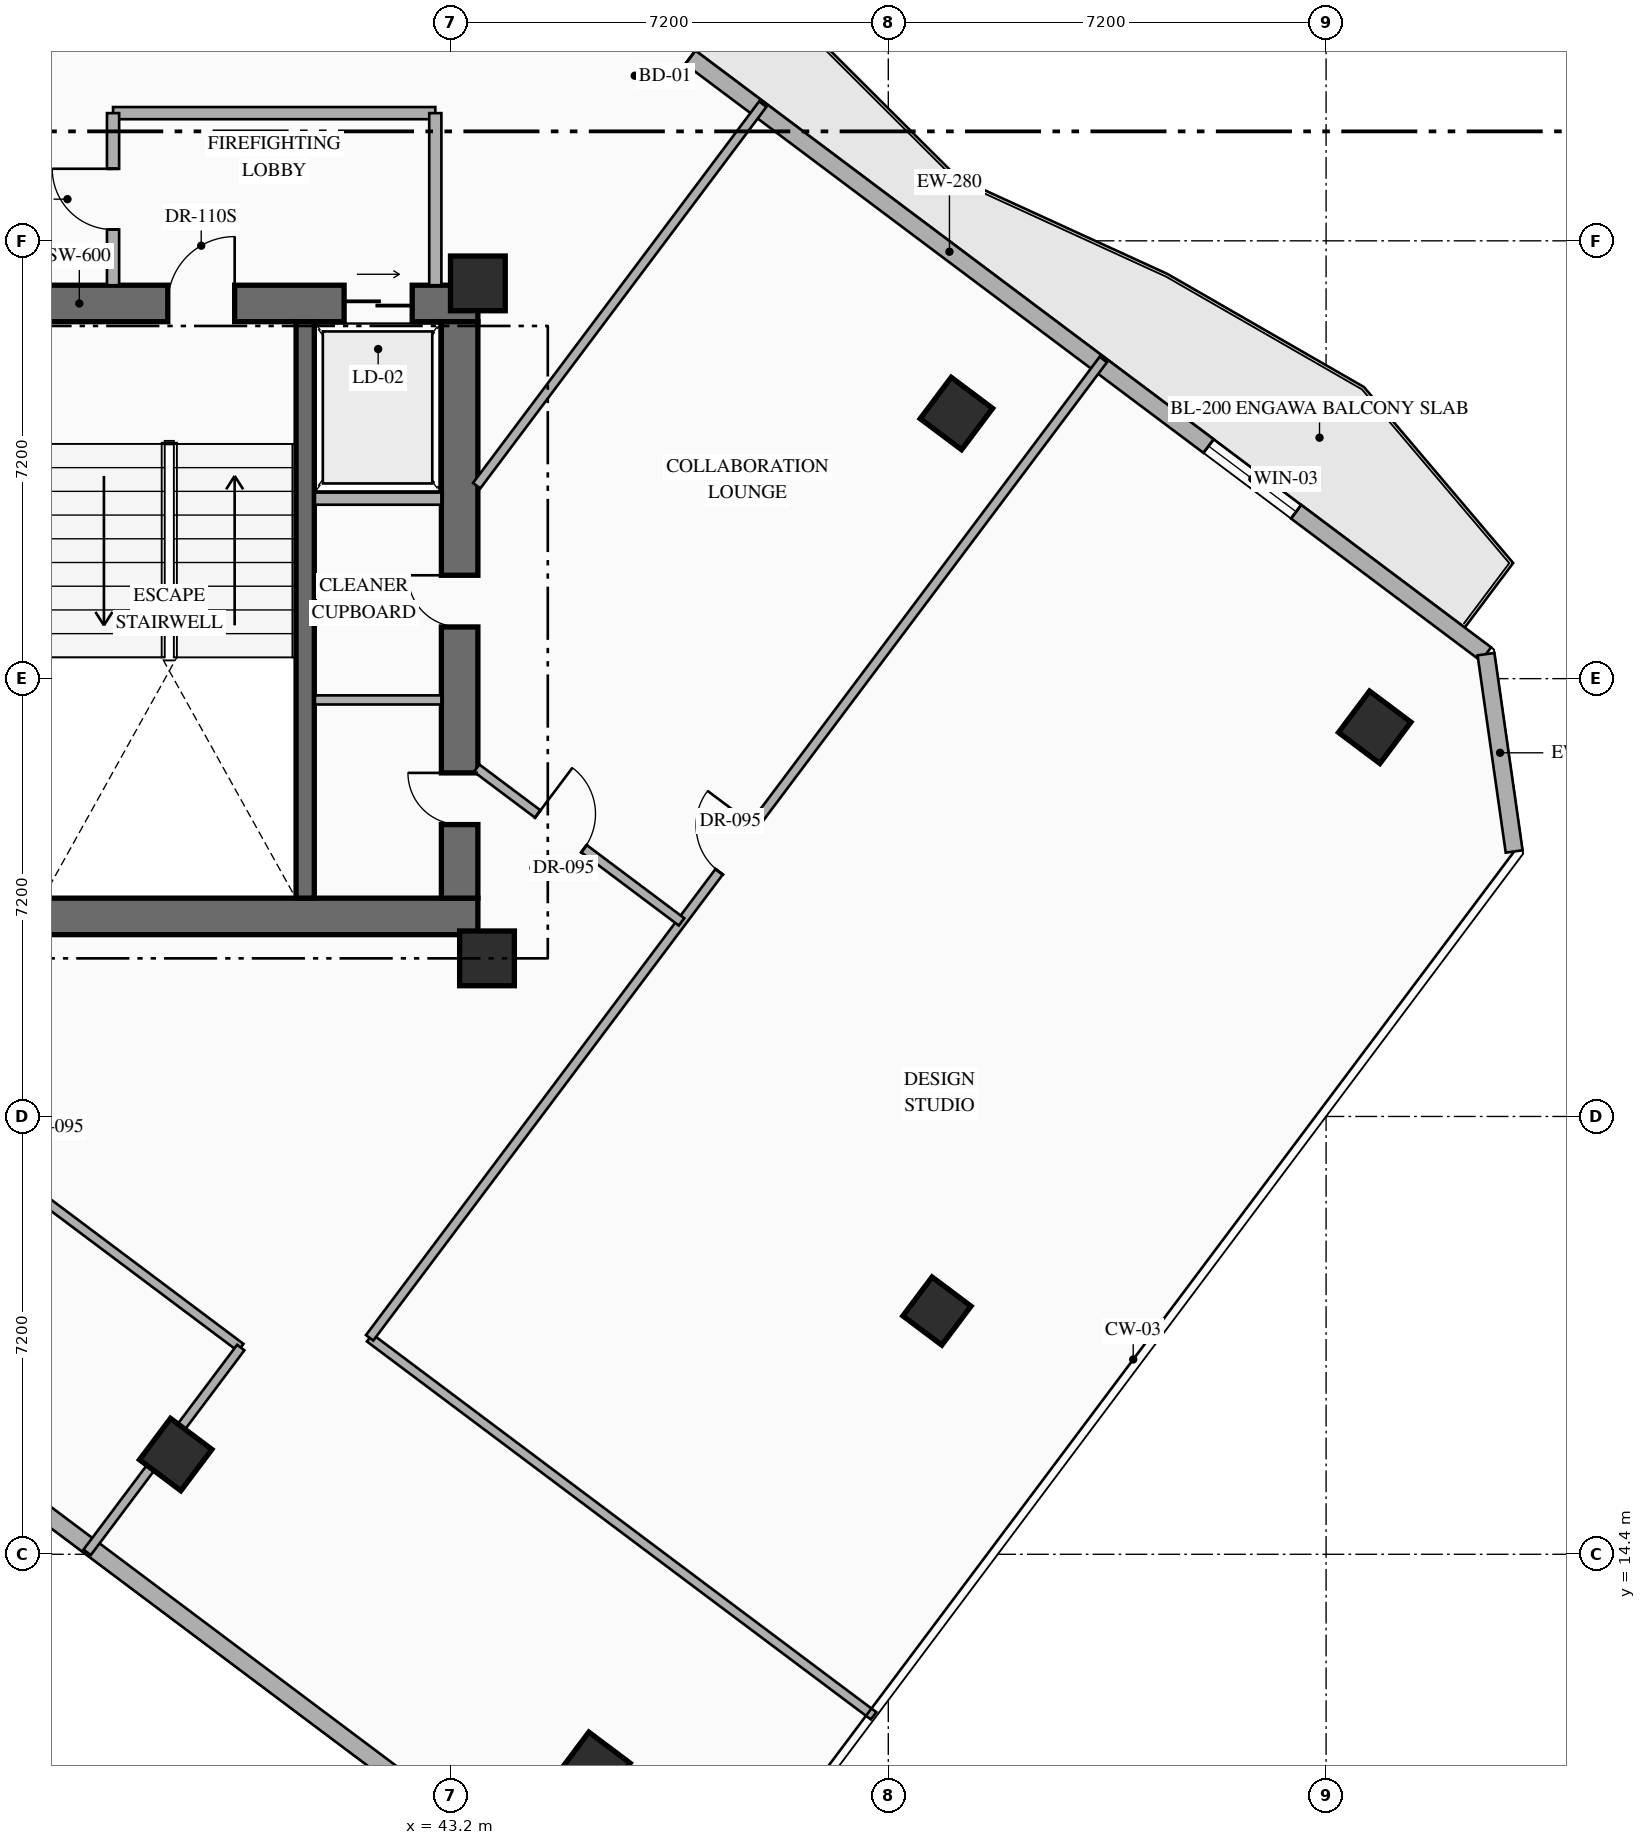
"""IFC4 building model, lengths in metres.
Left out: names, types, materials, properties, quantities, classifications, styles, units other than length and angle.
Written with IfcOpenShell. Run it as: python <this file> out.ifc"""

import sys

from ifc_helpers import new_model, si_unit, direction, frame, frame_2d, origin, origin_2d, place, context, subcontext, project, spatial, rectangle, hollow_rectangle, extrude, element, fill, save


model = new_model("IFC4")
c1 = context("Model", 3, precision=1e-05, world=origin(), true_north=direction((0.0, 1.0)))
c2 = subcontext(c1, "Body", "Model", "MODEL_VIEW")
j1 = project(units=[si_unit("LENGTHUNIT", "METRE"), si_unit("PLANEANGLEUNIT", "RADIAN")], contexts=[c1])
p1 = place(None, origin())
s1 = spatial("IfcSite", under=j1, at=p1, CompositionType="ELEMENT")
p2 = place(p1, origin())
s2 = spatial("IfcBuilding", under=s1, at=p2, CompositionType="ELEMENT")
p3 = place(p2, frame((0.0, 0.0, 134.85)))
s3 = spatial("IfcBuildingStorey", under=s2, at=p3, CompositionType="ELEMENT", Elevation=134.85)
p4 = place(p3, frame((35.89, 24.89, 0.0), z_axis=(0.0, 0.0, 1.0), x_axis=(1.0, 0.0, 0.0)))
e1 = element("IfcWall", 1, at=p4, inside=s3, PredefinedType="SHEAR", context=c2, shape_type="SweptSolid", body=[
    extrude(rectangle(XDim=7.76, YDim=0.6, at=frame_2d((3.88, 0.0))), origin(), (0.0, 0.0, 1.0), 3.6),
])
p5 = place(p3, frame((35.89, 34.97, 0.0), z_axis=(0.0, 0.0, 1.0), x_axis=(1.0, 0.0, 0.0)))
e2 = element("IfcWall", 2, at=p5, inside=s3, PredefinedType="SHEAR", context=c2, shape_type="SweptSolid", body=[
    extrude(rectangle(XDim=7.76, YDim=0.6, at=frame_2d((3.88, 0.0))), origin(), (0.0, 0.0, 1.0), 3.6),
])
p6 = place(p5, frame((2.66, 0.0, 0.0)))
e3 = element("IfcOpeningElement", 3, at=p6, cuts=e2, PredefinedType="OPENING", context=c2, shape_type="SweptSolid", body=[
    extrude(rectangle(XDim=1.1, YDim=2.2, at=frame_2d((0.55, 1.1))), frame((0.0, 0.31, 0.0), z_axis=(0.0, -1.0, 0.0), x_axis=(1.0, 0.0, 0.0)), (0.0, 0.0, 1.0), 0.62),
])
p7 = place(p5, frame((5.56, 0.0, 0.0)))
e4 = element("IfcOpeningElement", 4, at=p7, cuts=e2, PredefinedType="OPENING", context=c2, shape_type="SweptSolid", body=[
    extrude(rectangle(XDim=1.12, YDim=2.15, at=frame_2d((0.56, 1.075))), frame((0.0, 0.31, 0.0), z_axis=(0.0, -1.0, 0.0), x_axis=(1.0, 0.0, 0.0)), (0.0, 0.0, 1.0), 0.62),
])
p8 = place(p3, frame((43.35, 25.19, 0.0), z_axis=(0.0, 0.0, 1.0), x_axis=(0.0, 1.0, 0.0)))
e5 = element("IfcWall", 5, at=p8, inside=s3, PredefinedType="SHEAR", context=c2, shape_type="SweptSolid", body=[
    extrude(rectangle(XDim=9.48, YDim=0.6, at=frame_2d((4.74, 0.0))), origin(), (0.0, 0.0, 1.0), 3.6),
])
p9 = place(p8, frame((1.21, 0.0, 0.0)))
e6 = element("IfcOpeningElement", 6, at=p9, cuts=e5, PredefinedType="OPENING", context=c2, shape_type="SweptSolid", body=[
    extrude(rectangle(XDim=0.85, YDim=2.08, at=frame_2d((0.425, 1.04))), frame((0.0, 0.31, 0.0), z_axis=(0.0, -1.0, 0.0), x_axis=(1.0, 0.0, 0.0)), (0.0, 0.0, 1.0), 0.62),
])
p10 = place(p8, frame((4.46, 0.0, 0.0)))
e7 = element("IfcOpeningElement", 7, at=p10, cuts=e5, PredefinedType="OPENING", context=c2, shape_type="SweptSolid", body=[
    extrude(rectangle(XDim=0.85, YDim=2.08, at=frame_2d((0.425, 1.04))), frame((0.0, 0.31, 0.0), z_axis=(0.0, -1.0, 0.0), x_axis=(1.0, 0.0, 0.0)), (0.0, 0.0, 1.0), 0.62),
])
p11 = place(p3, frame((40.81, 25.19, 0.0), z_axis=(0.0, 0.0, 1.0), x_axis=(0.0, 1.0, 0.0)))
e8 = element("IfcWall", 8, at=p11, inside=s3, PredefinedType="SHEAR", context=c2, shape_type="SweptSolid", body=[
    extrude(rectangle(XDim=9.48, YDim=0.3, at=frame_2d((4.74, 0.0))), origin(), (0.0, 0.0, 1.0), 3.6),
])
for number, where, z_axis, x_axis in (
    (9, (43.8, 24.2, 0.0), (0.0, 0.0, 1.0), (1.0, 0.0, 0.0)),
    (10, (43.65, 35.3, 0.0), (0.0, 0.0, 1.0), (1.0, 0.0, 0.0)),
):
    element("IfcColumn", number, at=place(p3, frame(where, z_axis=z_axis, x_axis=x_axis)), inside=s3, PredefinedType="COLUMN", context=c2, shape_type="SweptSolid", body=[
        extrude(rectangle(XDim=0.9, YDim=0.9, at=origin_2d()), origin(), (0.0, 0.0, 1.0), 3.6),
    ])
for number, where, z_axis, x_axis in (
    (11, (38.68, 16.04, 0.0), (0.0, 0.0, 1.0), (0.8, -0.6, 0.0)),
    (12, (51.52, 33.16, 0.0), (0.0, 0.0, 1.0), (0.8, -0.6, 0.0)),
    (13, (45.56, 10.88, 0.0), (0.0, 0.0, 1.0), (0.8, -0.6, 0.0)),
    (14, (58.4, 28.0, 0.0), (0.0, 0.0, 1.0), (0.8, -0.6, 0.0)),
):
    element("IfcColumn", number, at=place(p3, frame(where, z_axis=z_axis, x_axis=x_axis)), inside=s3, PredefinedType="COLUMN", context=c2, shape_type="SweptSolid", body=[
        extrude(hollow_rectangle(XDim=0.85, YDim=0.85, WallThickness=0.032, at=origin_2d()), origin(), (0.0, 0.0, 1.0), 3.6),
    ])
p12 = place(p3, frame((51.2, 18.4, 0.0), z_axis=(0.0, 0.0, 1.0), x_axis=(0.799999996291, -0.600000004945, 0.0)))
e15 = element("IfcColumn", 15, at=p12, inside=s3, PredefinedType="COLUMN", context=c2, shape_type="SweptSolid", body=[
    extrude(hollow_rectangle(XDim=0.8, YDim=0.8, WallThickness=0.032, at=origin_2d()), origin(), (0.0, 0.0, 1.0), 3.6),
])
p13 = place(p3, frame((44.86, 40.73, 0.0), z_axis=(0.0, 0.0, 1.0), x_axis=(0.800007624502, -0.599989833863, 0.0)))
e16 = element("IfcWall", 16, at=p13, inside=s3, PredefinedType="STANDARD", context=c2, shape_type="SweptSolid", body=[
    extrude(rectangle(XDim=19.212, YDim=0.28, at=frame_2d((9.606, 0.0))), origin(), (0.0, 0.0, 1.0), 3.35),
])
p14 = place(p13, frame((1.755, 0.0, 0.0)))
e17 = element("IfcOpeningElement", 17, at=p14, cuts=e16, PredefinedType="OPENING", context=c2, shape_type="SweptSolid", body=[
    extrude(rectangle(XDim=1.1, YDim=2.2, at=frame_2d((0.55, 1.1))), frame((0.0, 0.15, 0.0), z_axis=(0.0, -1.0, 0.0), x_axis=(1.0, 0.0, 0.0)), (0.0, 0.0, 1.0), 0.3),
])
p15 = place(p13, frame((13.509, 0.0, 0.85)))
e18 = element("IfcOpeningElement", 18, at=p15, cuts=e16, PredefinedType="OPENING", context=c2, shape_type="SweptSolid", body=[
    extrude(rectangle(XDim=1.8, YDim=2.1, at=frame_2d((0.9, 1.05))), frame((0.0, 0.15, 0.0), z_axis=(0.0, -1.0, 0.0), x_axis=(1.0, 0.0, 0.0)), (0.0, 0.0, 1.0), 0.3),
])
p16 = place(p3, frame((60.23, 29.203, 0.0), z_axis=(0.0, 0.0, 1.0), x_axis=(0.141296221922, -0.989967361922, 0.0)))
e19 = element("IfcWall", 19, at=p16, inside=s3, PredefinedType="STANDARD", context=c2, shape_type="SweptSolid", body=[
    extrude(rectangle(XDim=3.278, YDim=0.28, at=frame_2d((1.639, 0.0))), origin(), (0.0, 0.0, 1.0), 3.35),
])
p17 = place(p3, frame((44.918, 8.787, 0.0), z_axis=(0.0, 0.0, 1.0), x_axis=(-0.800004765927, 0.599993645378, 0.0)))
e20 = element("IfcWall", 20, at=p17, inside=s3, PredefinedType="STANDARD", context=c2, shape_type="SweptSolid", body=[
    extrude(rectangle(XDim=24.588, YDim=0.28, at=frame_2d((12.294, 0.0))), origin(), (0.0, 0.0, 1.0), 3.35),
])
p18 = place(p3, frame((40.97, 31.76, 0.0), z_axis=(0.0, 0.0, 1.0), x_axis=(1.0, 0.0, 0.0)))
e21 = element("IfcWall", 21, at=p18, inside=s3, PredefinedType="STANDARD", context=c2, shape_type="SweptSolid", body=[
    extrude(rectangle(XDim=2.08, YDim=0.2, at=frame_2d((1.04, 0.0))), origin(), (0.0, 0.0, 1.0), 3.35),
])
p19 = place(p3, frame((40.97, 28.45, 0.0), z_axis=(0.0, 0.0, 1.0), x_axis=(1.0, 0.0, 0.0)))
e22 = element("IfcWall", 22, at=p19, inside=s3, PredefinedType="PARTITIONING", context=c2, shape_type="SweptSolid", body=[
    extrude(rectangle(XDim=2.08, YDim=0.15, at=frame_2d((1.04, 0.0))), origin(), (0.0, 0.0, 1.0), 3.35),
])
p20 = place(p3, frame((37.65, 38.1, 0.0), z_axis=(0.0, 0.0, 1.0), x_axis=(1.0, 0.0, 0.0)))
e23 = element("IfcWall", 23, at=p20, inside=s3, PredefinedType="STANDARD", context=c2, shape_type="SweptSolid", body=[
    extrude(rectangle(XDim=5.3, YDim=0.2, at=frame_2d((2.65, 0.0))), origin(), (0.0, 0.0, 1.0), 3.35),
])
p21 = place(p3, frame((42.95, 35.27, 0.0), z_axis=(0.0, 0.0, 1.0), x_axis=(0.0, 1.0, 0.0)))
e24 = element("IfcWall", 24, at=p21, inside=s3, PredefinedType="STANDARD", context=c2, shape_type="SweptSolid", body=[
    extrude(rectangle(XDim=2.83, YDim=0.2, at=frame_2d((1.415, 0.0))), origin(), (0.0, 0.0, 1.0), 3.35),
])
p22 = place(p3, frame((37.65, 35.27, 0.0), z_axis=(0.0, 0.0, 1.0), x_axis=(0.0, 1.0, 0.0)))
e25 = element("IfcWall", 25, at=p22, inside=s3, PredefinedType="STANDARD", context=c2, shape_type="SweptSolid", body=[
    extrude(rectangle(XDim=2.83, YDim=0.2, at=frame_2d((1.415, 0.0))), origin(), (0.0, 0.0, 1.0), 3.35),
])
p23 = place(p22, frame((0.915, 0.0, 0.0)))
e26 = element("IfcOpeningElement", 26, at=p23, cuts=e25, PredefinedType="OPENING", context=c2, shape_type="SweptSolid", body=[
    extrude(rectangle(XDim=1.0, YDim=2.2, at=frame_2d((0.5, 1.1))), frame((0.0, 0.11, 0.0), z_axis=(0.0, -1.0, 0.0), x_axis=(1.0, 0.0, 0.0)), (0.0, 0.0, 1.0), 0.22),
])
p24 = place(p3, frame((41.87, 17.96, 0.0), z_axis=(0.0, 0.0, 1.0), x_axis=(0.799991516197, -0.600011311571, 0.0)))
e27 = element("IfcWall", 27, at=p24, inside=s3, PredefinedType="PARTITIONING", context=c2, shape_type="SweptSolid", body=[
    extrude(rectangle(XDim=10.36, YDim=0.15, at=frame_2d((5.18, 0.0))), origin(), (0.0, 0.0, 1.0), 3.35),
])
p25 = place(p3, frame((41.87, 17.96, 0.0), z_axis=(0.0, 0.0, 1.0), x_axis=(0.599994172676, 0.80000437046, 0.0)))
e28 = element("IfcWall", 28, at=p25, inside=s3, PredefinedType="PARTITIONING", context=c2, shape_type="SweptSolid", body=[
    extrude(rectangle(XDim=20.11, YDim=0.15, at=frame_2d((10.055, 0.0))), origin(), (0.0, 0.0, 1.0), 3.35),
])
p26 = place(p25, frame((9.58, 0.0, 0.0)))
e29 = element("IfcOpeningElement", 29, at=p26, cuts=e28, PredefinedType="OPENING", context=c2, shape_type="SweptSolid", body=[
    extrude(rectangle(XDim=0.95, YDim=2.15, at=frame_2d((0.475, 1.075))), frame((0.0, 0.085, 0.0), z_axis=(0.0, -1.0, 0.0), x_axis=(1.0, 0.0, 0.0)), (0.0, 0.0, 1.0), 0.17),
])
p27 = place(p3, frame((43.63, 27.328, 0.0), z_axis=(0.0, 0.0, 1.0), x_axis=(0.799972182084, -0.600037088764, 0.0)))
e30 = element("IfcWall", 30, at=p27, inside=s3, PredefinedType="PARTITIONING", context=c2, shape_type="SweptSolid", body=[
    extrude(rectangle(XDim=4.213, YDim=0.15, at=frame_2d((2.106, 0.0))), origin(), (0.0, 0.0, 1.0), 3.045),
])
p28 = place(p27, frame((1.256, 0.0, 0.0)))
e31 = element("IfcOpeningElement", 31, at=p28, cuts=e30, PredefinedType="OPENING", context=c2, shape_type="SweptSolid", body=[
    extrude(rectangle(XDim=0.95, YDim=2.15, at=frame_2d((0.475, 1.075))), frame((0.0, 0.085, 0.0), z_axis=(0.0, -1.0, 0.0), x_axis=(1.0, 0.0, 0.0)), (0.0, 0.0, 1.0), 0.17),
])
p29 = place(p3, frame((43.63, 31.973, 0.0), z_axis=(0.0, 0.0, 1.0), x_axis=(0.599975099311, 0.800018674911, 0.0)))
e32 = element("IfcWall", 32, at=p29, inside=s3, PredefinedType="PARTITIONING", context=c2, shape_type="SweptSolid", body=[
    extrude(rectangle(XDim=7.844, YDim=0.15, at=frame_2d((3.922, 0.0))), origin(), (0.0, 0.0, 1.0), 3.35),
])
p30 = place(p3, frame((27.91, 26.68, 0.0), z_axis=(0.0, 0.0, 1.0), x_axis=(0.800005938517, -0.599992081896, 0.0)))
e33 = element("IfcWall", 33, at=p30, inside=s3, PredefinedType="PARTITIONING", context=c2, shape_type="SweptSolid", body=[
    extrude(rectangle(XDim=14.8, YDim=0.15, at=frame_2d((7.4, 0.0))), origin(), (0.0, 0.0, 1.0), 3.35),
])
p31 = place(p30, frame((9.281, 0.0, 0.0)))
e34 = element("IfcOpeningElement", 34, at=p31, cuts=e33, PredefinedType="OPENING", context=c2, shape_type="SweptSolid", body=[
    extrude(rectangle(XDim=0.95, YDim=2.15, at=frame_2d((0.475, 1.075))), frame((0.0, 0.085, 0.0), z_axis=(0.0, -1.0, 0.0), x_axis=(1.0, 0.0, 0.0)), (0.0, 0.0, 1.0), 0.17),
])
p32 = place(p3, frame((37.224, 14.432, 0.0), z_axis=(0.0, 0.0, 1.0), x_axis=(0.599962885857, 0.800027834262, 0.0)))
e35 = element("IfcWall", 35, at=p32, inside=s3, PredefinedType="PARTITIONING", context=c2, shape_type="SweptSolid", body=[
    extrude(rectangle(XDim=4.21, YDim=0.15, at=frame_2d((2.105, 0.0))), origin(), (0.0, 0.0, 1.0), 2.695),
])
p33 = place(p14, origin())
e36 = element("IfcDoor", 36, at=p33, inside=s3, OperationType="SINGLE_SWING_LEFT", PredefinedType="DOOR", context=c2, shape_type="SweptSolid", body=[
    extrude(rectangle(XDim=1.1, YDim=2.2, at=frame_2d((0.55, 1.1))), frame((0.0, 0.025, 0.0), z_axis=(0.0, -1.0, 0.0), x_axis=(1.0, 0.0, 0.0)), (0.0, 0.0, 1.0), 0.05),
])
fill(e17, e36)
p34 = place(p15, origin())
e37 = element("IfcWindow", 37, at=p34, inside=s3, PartitioningType="SINGLE_PANEL", PredefinedType="WINDOW", context=c2, shape_type="SweptSolid", body=[
    extrude(rectangle(XDim=1.8, YDim=2.1, at=frame_2d((0.9, 1.05))), frame((0.0, 0.03, 0.0), z_axis=(0.0, -1.0, 0.0), x_axis=(1.0, 0.0, 0.0)), (0.0, 0.0, 1.0), 0.06),
])
fill(e18, e37)
p35 = place(p6, origin())
e38 = element("IfcDoor", 38, at=p35, inside=s3, OperationType="SINGLE_SWING_RIGHT", PredefinedType="DOOR", context=c2, shape_type="SweptSolid", body=[
    extrude(rectangle(XDim=1.1, YDim=2.2, at=frame_2d((0.55, 1.1))), frame((0.0, 0.025, 0.0), z_axis=(0.0, -1.0, 0.0), x_axis=(1.0, 0.0, 0.0)), (0.0, 0.0, 1.0), 0.05),
])
fill(e3, e38)
p36 = place(p7, origin())
e39 = element("IfcDoor", 39, at=p36, inside=s3, OperationType="SLIDING_TO_RIGHT", PredefinedType="USERDEFINED", context=c2, shape_type="SweptSolid", body=[
    extrude(rectangle(XDim=1.12, YDim=2.15, at=frame_2d((0.56, 1.075))), frame((0.0, 0.025, 0.0), z_axis=(0.0, -1.0, 0.0), x_axis=(1.0, 0.0, 0.0)), (0.0, 0.0, 1.0), 0.05),
])
fill(e4, e39)
p37 = place(p9, origin())
e40 = element("IfcDoor", 40, at=p37, inside=s3, OperationType="SINGLE_SWING_RIGHT", PredefinedType="DOOR", context=c2, shape_type="SweptSolid", body=[
    extrude(rectangle(XDim=0.85, YDim=2.08, at=frame_2d((0.425, 1.04))), frame((0.0, 0.025, 0.0), z_axis=(0.0, -1.0, 0.0), x_axis=(1.0, 0.0, 0.0)), (0.0, 0.0, 1.0), 0.05),
])
fill(e6, e40)
p38 = place(p10, origin())
e41 = element("IfcDoor", 41, at=p38, inside=s3, OperationType="SINGLE_SWING_RIGHT", PredefinedType="DOOR", context=c2, shape_type="SweptSolid", body=[
    extrude(rectangle(XDim=0.85, YDim=2.08, at=frame_2d((0.425, 1.04))), frame((0.0, 0.025, 0.0), z_axis=(0.0, -1.0, 0.0), x_axis=(1.0, 0.0, 0.0)), (0.0, 0.0, 1.0), 0.05),
])
fill(e7, e41)
p39 = place(p23, origin())
e42 = element("IfcDoor", 42, at=p39, inside=s3, OperationType="SINGLE_SWING_RIGHT", PredefinedType="DOOR", context=c2, shape_type="SweptSolid", body=[
    extrude(rectangle(XDim=1.0, YDim=2.2, at=frame_2d((0.5, 1.1))), frame((0.0, 0.025, 0.0), z_axis=(0.0, -1.0, 0.0), x_axis=(1.0, 0.0, 0.0)), (0.0, 0.0, 1.0), 0.05),
])
fill(e26, e42)
p40 = place(p26, origin())
e43 = element("IfcDoor", 43, at=p40, inside=s3, OperationType="SINGLE_SWING_RIGHT", PredefinedType="DOOR", context=c2, shape_type="SweptSolid", body=[
    extrude(rectangle(XDim=0.95, YDim=2.15, at=frame_2d((0.475, 1.075))), frame((0.0, 0.025, 0.0), z_axis=(0.0, -1.0, 0.0), x_axis=(1.0, 0.0, 0.0)), (0.0, 0.0, 1.0), 0.05),
])
fill(e29, e43)
p41 = place(p28, origin())
e44 = element("IfcDoor", 44, at=p41, inside=s3, OperationType="SINGLE_SWING_LEFT", PredefinedType="DOOR", context=c2, shape_type="SweptSolid", body=[
    extrude(rectangle(XDim=0.95, YDim=2.15, at=frame_2d((0.475, 1.075))), frame((0.0, 0.025, 0.0), z_axis=(0.0, -1.0, 0.0), x_axis=(1.0, 0.0, 0.0)), (0.0, 0.0, 1.0), 0.05),
])
fill(e31, e44)
save(model, sys.argv[1])
